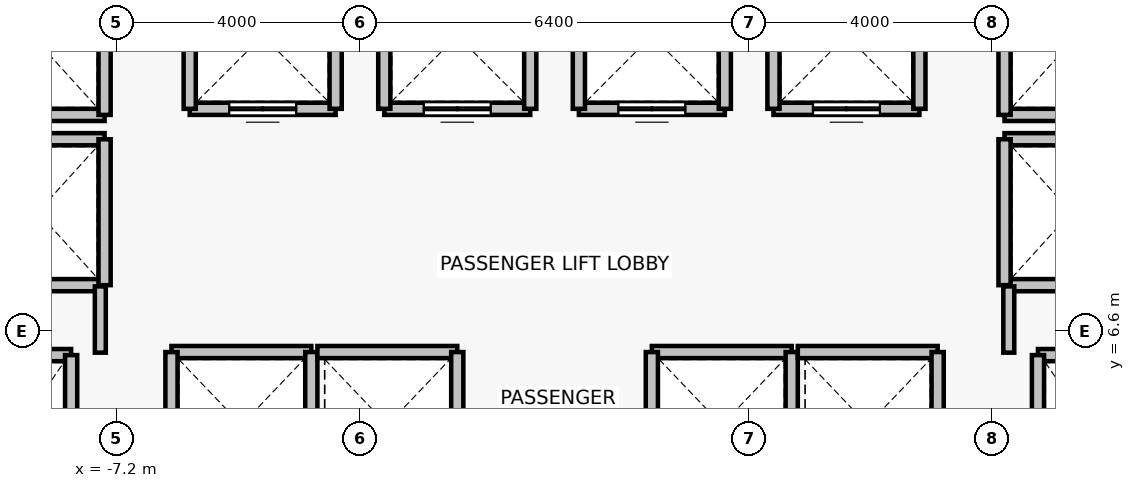
"""IFC4 building model, lengths in metres.
Left out: names, types, materials, properties, quantities, classifications, styles, units other than length and angle.
Written with IfcOpenShell. Run it as: python <this file> out.ifc"""

import sys

from ifc_helpers import new_model, si_unit, direction, frame, frame_2d, origin, place, context, subcontext, project, spatial, rectangle, extrude, source, transform, mapped, element, fill, save


model = new_model("IFC4")
c1 = context("Model", 3, precision=1e-05, world=origin(), true_north=direction((0.0, 1.0)))
c2 = subcontext(c1, "Body", "Model", "MODEL_VIEW")
j1 = project(units=[si_unit("LENGTHUNIT", "METRE"), si_unit("PLANEANGLEUNIT", "RADIAN")], contexts=[c1])
p1 = place(None, origin())
s1 = spatial("IfcSite", under=j1, at=p1, CompositionType="ELEMENT")
p2 = place(p1, origin())
s2 = spatial("IfcBuilding", under=s1, at=p2, CompositionType="ELEMENT")
p3 = place(p2, frame((0.0, 0.0, 50.5)))
s3 = spatial("IfcBuildingStorey", under=s2, at=p3, CompositionType="ELEMENT", Elevation=50.5)
p4 = place(p3, frame((-9.95, 6.2, 0.0), z_axis=(0.0, 0.0, 1.0), x_axis=(1.0, 0.0, 0.0)))
e1 = element("IfcWall", 1, at=p4, inside=s3, PredefinedType="SOLIDWALL", context=c2, shape_type="SweptSolid", body=[
    extrude(rectangle(XDim=2.0, YDim=0.2, at=frame_2d((1.0, 0.0))), origin(), (0.0, 0.0, 1.0), 3.075),
])
p5 = place(p3, frame((-7.95, 6.2, 0.0), z_axis=(0.0, 0.0, 1.0), x_axis=(0.0, -1.0, 0.0)))
e2 = element("IfcWall", 2, at=p5, inside=s3, PredefinedType="SOLIDWALL", context=c2, shape_type="SweptSolid", body=[
    extrude(rectangle(XDim=2.8, YDim=0.2, at=frame_2d((1.4, 0.0))), origin(), (0.0, 0.0, 1.0), 3.075),
])
p6 = place(p3, frame((7.95, 6.2, 0.0), z_axis=(0.0, 0.0, 1.0), x_axis=(1.0, 0.0, 0.0)))
e3 = element("IfcWall", 3, at=p6, inside=s3, PredefinedType="SOLIDWALL", context=c2, shape_type="SweptSolid", body=[
    extrude(rectangle(XDim=2.0, YDim=0.2, at=frame_2d((1.0, 0.0))), origin(), (0.0, 0.0, 1.0), 3.075),
])
p7 = place(p3, frame((7.95, 3.4, 0.0), z_axis=(0.0, 0.0, 1.0), x_axis=(0.0, 1.0, 0.0)))
e4 = element("IfcWall", 4, at=p7, inside=s3, PredefinedType="SOLIDWALL", context=c2, shape_type="SweptSolid", body=[
    extrude(rectangle(XDim=2.8, YDim=0.2, at=frame_2d((1.4, 0.0))), origin(), (0.0, 0.0, 1.0), 3.075),
])
p8 = place(p3, frame((-3.6, 10.25, 0.0), z_axis=(0.0, 0.0, 1.0), x_axis=(-1.0, 0.0, 0.0)))
e5 = element("IfcWall", 5, at=p8, inside=s3, PredefinedType="SOLIDWALL", context=c2, shape_type="SweptSolid", body=[
    extrude(rectangle(XDim=2.4, YDim=0.2, at=frame_2d((1.2, 0.0))), origin(), (0.0, 0.0, 1.0), 3.075),
])
p9 = place(p8, frame((0.65, 0.0, 0.0)))
e6 = element("IfcOpeningElement", 6, at=p9, cuts=e5, PredefinedType="OPENING", context=c2, shape_type="SweptSolid", body=[
    extrude(rectangle(XDim=1.1, YDim=2.2, at=frame_2d((0.55, 1.1))), frame((0.0, 0.11, 0.0), z_axis=(0.0, -1.0, 0.0), x_axis=(1.0, 0.0, 0.0)), (0.0, 0.0, 1.0), 0.22),
])
for number, where, z_axis, x_axis in (
    (7, (-6.0, 10.25, 0.0), (0.0, 0.0, 1.0), (0.0, 1.0, 0.0)),
    (8, (-3.6, 12.65, 0.0), (0.0, 0.0, 1.0), (0.0, -1.0, 0.0)),
):
    element("IfcWall", number, at=place(p3, frame(where, z_axis=z_axis, x_axis=x_axis)), inside=s3, PredefinedType="SOLIDWALL", context=c2, shape_type="SweptSolid", body=[
        extrude(rectangle(XDim=2.4, YDim=0.2, at=frame_2d((1.2, 0.0))), origin(), (0.0, 0.0, 1.0), 3.075),
    ])
p10 = place(p3, frame((-0.4, 10.25, 0.0), z_axis=(0.0, 0.0, 1.0), x_axis=(-1.0, 0.0, 0.0)))
e9 = element("IfcWall", 9, at=p10, inside=s3, PredefinedType="SOLIDWALL", context=c2, shape_type="SweptSolid", body=[
    extrude(rectangle(XDim=2.4, YDim=0.2, at=frame_2d((1.2, 0.0))), origin(), (0.0, 0.0, 1.0), 3.075),
])
p11 = place(p10, frame((0.65, 0.0, 0.0)))
e10 = element("IfcOpeningElement", 10, at=p11, cuts=e9, PredefinedType="OPENING", context=c2, shape_type="SweptSolid", body=[
    extrude(rectangle(XDim=1.1, YDim=2.2, at=frame_2d((0.55, 1.1))), frame((0.0, 0.11, 0.0), z_axis=(0.0, -1.0, 0.0), x_axis=(1.0, 0.0, 0.0)), (0.0, 0.0, 1.0), 0.22),
])
for number, where, z_axis, x_axis in (
    (11, (-2.8, 10.25, 0.0), (0.0, 0.0, 1.0), (0.0, 1.0, 0.0)),
    (12, (-0.4, 12.65, 0.0), (0.0, 0.0, 1.0), (0.0, -1.0, 0.0)),
):
    element("IfcWall", number, at=place(p3, frame(where, z_axis=z_axis, x_axis=x_axis)), inside=s3, PredefinedType="SOLIDWALL", context=c2, shape_type="SweptSolid", body=[
        extrude(rectangle(XDim=2.4, YDim=0.2, at=frame_2d((1.2, 0.0))), origin(), (0.0, 0.0, 1.0), 3.075),
    ])
p12 = place(p3, frame((2.8, 10.25, 0.0), z_axis=(0.0, 0.0, 1.0), x_axis=(-1.0, 0.0, 0.0)))
e13 = element("IfcWall", 13, at=p12, inside=s3, PredefinedType="SOLIDWALL", context=c2, shape_type="SweptSolid", body=[
    extrude(rectangle(XDim=2.4, YDim=0.2, at=frame_2d((1.2, 0.0))), origin(), (0.0, 0.0, 1.0), 3.075),
])
p13 = place(p12, frame((0.65, 0.0, 0.0)))
e14 = element("IfcOpeningElement", 14, at=p13, cuts=e13, PredefinedType="OPENING", context=c2, shape_type="SweptSolid", body=[
    extrude(rectangle(XDim=1.1, YDim=2.2, at=frame_2d((0.55, 1.1))), frame((0.0, 0.11, 0.0), z_axis=(0.0, -1.0, 0.0), x_axis=(1.0, 0.0, 0.0)), (0.0, 0.0, 1.0), 0.22),
])
for number, where, z_axis, x_axis in (
    (15, (0.4, 10.25, 0.0), (0.0, 0.0, 1.0), (0.0, 1.0, 0.0)),
    (16, (2.8, 12.65, 0.0), (0.0, 0.0, 1.0), (0.0, -1.0, 0.0)),
):
    element("IfcWall", number, at=place(p3, frame(where, z_axis=z_axis, x_axis=x_axis)), inside=s3, PredefinedType="SOLIDWALL", context=c2, shape_type="SweptSolid", body=[
        extrude(rectangle(XDim=2.4, YDim=0.2, at=frame_2d((1.2, 0.0))), origin(), (0.0, 0.0, 1.0), 3.075),
    ])
p14 = place(p3, frame((6.0, 10.25, 0.0), z_axis=(0.0, 0.0, 1.0), x_axis=(-1.0, 0.0, 0.0)))
e17 = element("IfcWall", 17, at=p14, inside=s3, PredefinedType="SOLIDWALL", context=c2, shape_type="SweptSolid", body=[
    extrude(rectangle(XDim=2.4, YDim=0.2, at=frame_2d((1.2, 0.0))), origin(), (0.0, 0.0, 1.0), 3.075),
])
p15 = place(p14, frame((0.65, 0.0, 0.0)))
e18 = element("IfcOpeningElement", 18, at=p15, cuts=e17, PredefinedType="OPENING", context=c2, shape_type="SweptSolid", body=[
    extrude(rectangle(XDim=1.1, YDim=2.2, at=frame_2d((0.55, 1.1))), frame((0.0, 0.11, 0.0), z_axis=(0.0, -1.0, 0.0), x_axis=(1.0, 0.0, 0.0)), (0.0, 0.0, 1.0), 0.22),
])
for number, where, z_axis, x_axis in (
    (19, (3.6, 10.25, 0.0), (0.0, 0.0, 1.0), (0.0, 1.0, 0.0)),
    (20, (6.0, 12.65, 0.0), (0.0, 0.0, 1.0), (0.0, -1.0, 0.0)),
):
    element("IfcWall", number, at=place(p3, frame(where, z_axis=z_axis, x_axis=x_axis)), inside=s3, PredefinedType="SOLIDWALL", context=c2, shape_type="SweptSolid", body=[
        extrude(rectangle(XDim=2.4, YDim=0.2, at=frame_2d((1.2, 0.0))), origin(), (0.0, 0.0, 1.0), 3.075),
    ])
p16 = place(p3, frame((-6.3, 6.25, 0.0), z_axis=(0.0, 0.0, 1.0), x_axis=(1.0, 0.0, 0.0)))
e21 = element("IfcWall", 21, at=p16, inside=s3, PredefinedType="SOLIDWALL", context=c2, shape_type="SweptSolid", body=[
    extrude(rectangle(XDim=2.3, YDim=0.2, at=frame_2d((1.15, 0.0))), origin(), (0.0, 0.0, 1.0), 3.075),
])
for number, where, z_axis, x_axis in (
    (22, (-6.3, 3.85, 0.0), (0.0, 0.0, 1.0), (0.0, 1.0, 0.0)),
    (23, (-4.0, 6.25, 0.0), (0.0, 0.0, 1.0), (0.0, -1.0, 0.0)),
):
    element("IfcWall", number, at=place(p3, frame(where, z_axis=z_axis, x_axis=x_axis)), inside=s3, PredefinedType="SOLIDWALL", context=c2, shape_type="SweptSolid", body=[
        extrude(rectangle(XDim=2.4, YDim=0.2, at=frame_2d((1.2, 0.0))), origin(), (0.0, 0.0, 1.0), 3.075),
    ])
p17 = place(p3, frame((-3.9, 6.25, 0.0), z_axis=(0.0, 0.0, 1.0), x_axis=(1.0, 0.0, 0.0)))
e24 = element("IfcWall", 24, at=p17, inside=s3, PredefinedType="SOLIDWALL", context=c2, shape_type="SweptSolid", body=[
    extrude(rectangle(XDim=2.3, YDim=0.2, at=frame_2d((1.15, 0.0))), origin(), (0.0, 0.0, 1.0), 3.075),
])
p18 = place(p3, frame((-1.6, 6.25, 0.0), z_axis=(0.0, 0.0, 1.0), x_axis=(0.0, -1.0, 0.0)))
e25 = element("IfcWall", 25, at=p18, inside=s3, PredefinedType="SOLIDWALL", context=c2, shape_type="SweptSolid", body=[
    extrude(rectangle(XDim=2.4, YDim=0.2, at=frame_2d((1.2, 0.0))), origin(), (0.0, 0.0, 1.0), 3.075),
])
p19 = place(p3, frame((1.6, 6.25, 0.0), z_axis=(0.0, 0.0, 1.0), x_axis=(1.0, 0.0, 0.0)))
e26 = element("IfcWall", 26, at=p19, inside=s3, PredefinedType="SOLIDWALL", context=c2, shape_type="SweptSolid", body=[
    extrude(rectangle(XDim=2.3, YDim=0.2, at=frame_2d((1.15, 0.0))), origin(), (0.0, 0.0, 1.0), 3.075),
])
for number, where, z_axis, x_axis in (
    (27, (1.6, 3.85, 0.0), (0.0, 0.0, 1.0), (0.0, 1.0, 0.0)),
    (28, (3.9, 6.25, 0.0), (0.0, 0.0, 1.0), (0.0, -1.0, 0.0)),
):
    element("IfcWall", number, at=place(p3, frame(where, z_axis=z_axis, x_axis=x_axis)), inside=s3, PredefinedType="SOLIDWALL", context=c2, shape_type="SweptSolid", body=[
        extrude(rectangle(XDim=2.4, YDim=0.2, at=frame_2d((1.2, 0.0))), origin(), (0.0, 0.0, 1.0), 3.075),
    ])
p20 = place(p3, frame((4.0, 6.25, 0.0), z_axis=(0.0, 0.0, 1.0), x_axis=(1.0, 0.0, 0.0)))
e29 = element("IfcWall", 29, at=p20, inside=s3, PredefinedType="SOLIDWALL", context=c2, shape_type="SweptSolid", body=[
    extrude(rectangle(XDim=2.3, YDim=0.2, at=frame_2d((1.15, 0.0))), origin(), (0.0, 0.0, 1.0), 3.075),
])
p21 = place(p3, frame((6.3, 6.25, 0.0), z_axis=(0.0, 0.0, 1.0), x_axis=(0.0, -1.0, 0.0)))
e30 = element("IfcWall", 30, at=p21, inside=s3, PredefinedType="SOLIDWALL", context=c2, shape_type="SweptSolid", body=[
    extrude(rectangle(XDim=2.4, YDim=0.2, at=frame_2d((1.2, 0.0))), origin(), (0.0, 0.0, 1.0), 3.075),
])
for number, where, z_axis, x_axis in (
    (31, (-7.4, 7.35, 0.0), (0.0, 0.0, 1.0), (-1.0, 0.0, 0.0)),
    (32, (-9.6, 9.75, 0.0), (0.0, 0.0, 1.0), (1.0, 0.0, 0.0)),
):
    element("IfcWall", number, at=place(p3, frame(where, z_axis=z_axis, x_axis=x_axis)), inside=s3, PredefinedType="SOLIDWALL", context=c2, shape_type="SweptSolid", body=[
        extrude(rectangle(XDim=2.2, YDim=0.2, at=frame_2d((1.1, 0.0))), origin(), (0.0, 0.0, 1.0), 2.465),
    ])
p22 = place(p3, frame((-7.4, 9.75, 0.0), z_axis=(0.0, 0.0, 1.0), x_axis=(0.0, -1.0, 0.0)))
e33 = element("IfcWall", 33, at=p22, inside=s3, PredefinedType="SOLIDWALL", context=c2, shape_type="SweptSolid", body=[
    extrude(rectangle(XDim=2.4, YDim=0.2, at=frame_2d((1.2, 0.0))), origin(), (0.0, 0.0, 1.0), 2.465),
])
p23 = place(p3, frame((-7.4, 10.15, 0.0), z_axis=(0.0, 0.0, 1.0), x_axis=(-1.0, 0.0, 0.0)))
e34 = element("IfcWall", 34, at=p23, inside=s3, PredefinedType="SOLIDWALL", context=c2, shape_type="SweptSolid", body=[
    extrude(rectangle(XDim=2.2, YDim=0.2, at=frame_2d((1.1, 0.0))), origin(), (0.0, 0.0, 1.0), 2.465),
])
p24 = place(p3, frame((-7.4, 12.55, 0.0), z_axis=(0.0, 0.0, 1.0), x_axis=(0.0, -1.0, 0.0)))
e35 = element("IfcWall", 35, at=p24, inside=s3, PredefinedType="SOLIDWALL", context=c2, shape_type="SweptSolid", body=[
    extrude(rectangle(XDim=2.4, YDim=0.2, at=frame_2d((1.2, 0.0))), origin(), (0.0, 0.0, 1.0), 2.465),
])
for number, where, z_axis, x_axis in (
    (36, (9.6, 7.35, 0.0), (0.0, 0.0, 1.0), (-1.0, 0.0, 0.0)),
    (37, (7.4, 9.75, 0.0), (0.0, 0.0, 1.0), (1.0, 0.0, 0.0)),
):
    element("IfcWall", number, at=place(p3, frame(where, z_axis=z_axis, x_axis=x_axis)), inside=s3, PredefinedType="SOLIDWALL", context=c2, shape_type="SweptSolid", body=[
        extrude(rectangle(XDim=2.2, YDim=0.2, at=frame_2d((1.1, 0.0))), origin(), (0.0, 0.0, 1.0), 2.465),
    ])
p25 = place(p3, frame((7.4, 7.35, 0.0), z_axis=(0.0, 0.0, 1.0), x_axis=(0.0, 1.0, 0.0)))
e38 = element("IfcWall", 38, at=p25, inside=s3, PredefinedType="SOLIDWALL", context=c2, shape_type="SweptSolid", body=[
    extrude(rectangle(XDim=2.4, YDim=0.2, at=frame_2d((1.2, 0.0))), origin(), (0.0, 0.0, 1.0), 2.465),
])
p26 = place(p3, frame((9.6, 10.15, 0.0), z_axis=(0.0, 0.0, 1.0), x_axis=(-1.0, 0.0, 0.0)))
e39 = element("IfcWall", 39, at=p26, inside=s3, PredefinedType="SOLIDWALL", context=c2, shape_type="SweptSolid", body=[
    extrude(rectangle(XDim=2.2, YDim=0.2, at=frame_2d((1.1, 0.0))), origin(), (0.0, 0.0, 1.0), 2.465),
])
p27 = place(p3, frame((7.4, 10.15, 0.0), z_axis=(0.0, 0.0, 1.0), x_axis=(0.0, 1.0, 0.0)))
e40 = element("IfcWall", 40, at=p27, inside=s3, PredefinedType="SOLIDWALL", context=c2, shape_type="SweptSolid", body=[
    extrude(rectangle(XDim=2.4, YDim=0.2, at=frame_2d((1.2, 0.0))), origin(), (0.0, 0.0, 1.0), 2.465),
])
for number, where, z_axis, x_axis in (
    (41, (-7.47, 7.33, 0.0), (0.0, 0.0, 1.0), (0.0, -1.0, 0.0)),
    (42, (7.47, 6.24, 0.0), (0.0, 0.0, 1.0), (0.0, 1.0, 0.0)),
):
    element("IfcWall", number, at=place(p3, frame(where, z_axis=z_axis, x_axis=x_axis)), inside=s3, PredefinedType="PARTITIONING", context=c2, shape_type="SweptSolid", body=[
        extrude(rectangle(XDim=1.09, YDim=0.18, at=frame_2d((0.545, 0.0))), origin(), (0.0, 0.0, 1.0), 2.465),
    ])
m1 = source(origin(), c2, "Body", "SweptSolid", [
    extrude(rectangle(XDim=1.1, YDim=2.2, at=frame_2d((0.55, 1.1))), frame((0.0, 0.025, 0.0), z_axis=(0.0, -1.0, 0.0), x_axis=(1.0, 0.0, 0.0)), (0.0, 0.0, 1.0), 0.05),
])
p28 = place(p9, origin())
e43 = element("IfcDoor", 43, at=p28, inside=s3, OperationType="DOUBLE_DOOR_SLIDING", PredefinedType="DOOR", context=c2, shape_type="MappedRepresentation", body=[
    mapped(m1, transform((0.0, 0.0, 0.0), x_axis=(1.0, 0.0, 0.0), y_axis=(0.0, 1.0, 0.0), z_axis=(0.0, 0.0, 1.0), scale=1.0)),
])
fill(e6, e43)
p29 = place(p11, origin())
e44 = element("IfcDoor", 44, at=p29, inside=s3, OperationType="DOUBLE_DOOR_SLIDING", PredefinedType="DOOR", context=c2, shape_type="MappedRepresentation", body=[
    mapped(m1, transform((0.0, 0.0, 0.0), x_axis=(1.0, 0.0, 0.0), y_axis=(0.0, 1.0, 0.0), z_axis=(0.0, 0.0, 1.0), scale=1.0)),
])
fill(e10, e44)
p30 = place(p13, origin())
e45 = element("IfcDoor", 45, at=p30, inside=s3, OperationType="DOUBLE_DOOR_SLIDING", PredefinedType="DOOR", context=c2, shape_type="MappedRepresentation", body=[
    mapped(m1, transform((0.0, 0.0, 0.0), x_axis=(1.0, 0.0, 0.0), y_axis=(0.0, 1.0, 0.0), z_axis=(0.0, 0.0, 1.0), scale=1.0)),
])
fill(e14, e45)
p31 = place(p15, origin())
e46 = element("IfcDoor", 46, at=p31, inside=s3, OperationType="DOUBLE_DOOR_SLIDING", PredefinedType="DOOR", context=c2, shape_type="MappedRepresentation", body=[
    mapped(m1, transform((0.0, 0.0, 0.0), x_axis=(1.0, 0.0, 0.0), y_axis=(0.0, 1.0, 0.0), z_axis=(0.0, 0.0, 1.0), scale=1.0)),
])
fill(e18, e46)
save(model, sys.argv[1])
